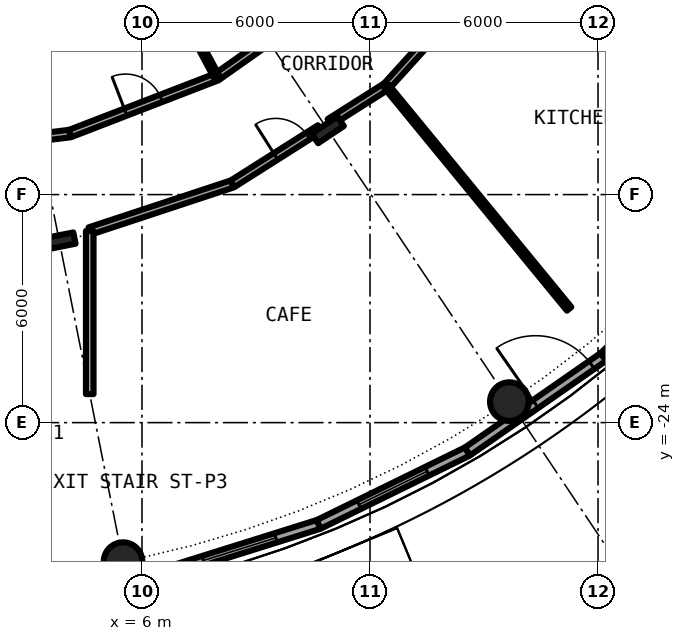
"""IFC4 building model, lengths in metres.
Left out: names, types, materials, properties, quantities, classifications, styles, units other than length and angle.
Written with IfcOpenShell. Run it as: python <this file> out.ifc"""

import sys

from ifc_helpers import new_model, si_unit, direction, frame, frame_2d, origin, origin_2d, place, context, subcontext, project, spatial, rectangle, hollow_circle, i_section, extrude, element, fill, save


model = new_model("IFC4")
c1 = context("Model", 3, precision=1e-05, world=origin(), true_north=direction((0.0, 1.0)))
c2 = subcontext(c1, "Body", "Model", "MODEL_VIEW")
j1 = project(units=[si_unit("LENGTHUNIT", "METRE"), si_unit("PLANEANGLEUNIT", "RADIAN")], contexts=[c1])
p1 = place(None, origin())
s1 = spatial("IfcSite", under=j1, at=p1, CompositionType="ELEMENT")
p2 = place(p1, origin())
s2 = spatial("IfcBuilding", under=s1, at=p2, CompositionType="ELEMENT")
p3 = place(p2, frame((0.0, 0.0, 9.6)))
s3 = spatial("IfcBuildingStorey", under=s2, at=p3, CompositionType="ELEMENT", Elevation=9.6)
for number, where, z_axis, x_axis in (
    (1, (5.501, -27.658, 0.0), (0.0, 0.0, 1.0), (1.0, 0.0, 0.0)),
    (2, (15.667, -23.448, 0.0), (0.0, 0.0, 1.0), (1.0, 0.0, 0.0)),
):
    element("IfcColumn", number, at=place(p3, frame(where, z_axis=z_axis, x_axis=x_axis)), inside=s3, PredefinedType="COLUMN", context=c2, shape_type="SweptSolid", body=[
        extrude(hollow_circle(Radius=0.508, WallThickness=0.05, at=origin_2d()), origin(), (0.0, 0.0, 1.0), 4.5),
    ])
for number, where, z_axis, x_axis in (
    (3, (3.824, -19.223, 0.0), (0.0, 0.0, 1.0), (0.195, -0.981, 0.0)),
    (4, (10.889, -16.297, 0.0), (0.0, 0.0, 1.0), (0.556, -0.831, 0.0)),
):
    element("IfcColumn", number, at=place(p3, frame(where, z_axis=z_axis, x_axis=x_axis)), inside=s3, PredefinedType="COLUMN", context=c2, shape_type="SweptSolid", body=[
        extrude(i_section(OverallWidth=0.303, OverallDepth=0.814, WebThickness=0.021, FlangeThickness=0.04, FilletRadius=0.03, at=origin_2d()), origin(), (0.0, 0.0, 1.0), 4.5),
    ])
p4 = place(p3, frame((6.489, -27.982, 0.0), z_axis=(0.0, 0.0, 1.0), x_axis=(0.954219534331, 0.299107138498, 0.0)))
e5 = element("IfcWall", 5, at=p4, inside=s3, PredefinedType="SOLIDWALL", context=c2, shape_type="SweptSolid", body=[
    extrude(rectangle(XDim=4.359, YDim=0.25, at=frame_2d((2.18, 0.0))), origin(), (0.0, 0.0, 1.0), 4.05),
])
p5 = place(p4, frame((1.18, 0.0, 0.9)))
e6 = element("IfcOpeningElement", 6, at=p5, cuts=e5, PredefinedType="OPENING", context=c2, shape_type="SweptSolid", body=[
    extrude(rectangle(XDim=2.0, YDim=2.4, at=frame_2d((1.0, 1.2))), frame((0.0, 0.135, 0.0), z_axis=(0.0, -1.0, 0.0), x_axis=(1.0, 0.0, 0.0)), (0.0, 0.0, 1.0), 0.27),
])
p6 = place(p3, frame((10.649, -26.678, 0.0), z_axis=(0.0, 0.0, 1.0), x_axis=(0.897938079481, 0.440121807478, 0.0)))
e7 = element("IfcWall", 7, at=p6, inside=s3, PredefinedType="SOLIDWALL", context=c2, shape_type="SweptSolid", body=[
    extrude(rectangle(XDim=4.36, YDim=0.25, at=frame_2d((2.18, 0.0))), origin(), (0.0, 0.0, 1.0), 4.05),
])
p7 = place(p6, frame((1.18, 0.0, 0.9)))
e8 = element("IfcOpeningElement", 8, at=p7, cuts=e7, PredefinedType="OPENING", context=c2, shape_type="SweptSolid", body=[
    extrude(rectangle(XDim=2.0, YDim=2.4, at=frame_2d((1.0, 1.2))), frame((0.0, 0.135, 0.0), z_axis=(0.0, -1.0, 0.0), x_axis=(1.0, 0.0, 0.0)), (0.0, 0.0, 1.0), 0.27),
])
p8 = place(p3, frame((14.564, -24.759, 0.0), z_axis=(0.0, 0.0, 1.0), x_axis=(0.820990800869, 0.57094141984, 0.0)))
e9 = element("IfcWall", 9, at=p8, inside=s3, PredefinedType="SOLIDWALL", context=c2, shape_type="SweptSolid", body=[
    extrude(rectangle(XDim=4.359, YDim=0.25, at=frame_2d((2.18, 0.0))), origin(), (0.0, 0.0, 1.0), 4.05),
])
p9 = place(p8, frame((2.183, 0.0, 0.0)))
e10 = element("IfcOpeningElement", 10, at=p9, cuts=e9, PredefinedType="OPENING", context=c2, shape_type="SweptSolid", body=[
    extrude(rectangle(XDim=1.8, YDim=2.2, at=frame_2d((0.9, 1.1))), frame((0.0, 0.135, 0.0), z_axis=(0.0, -1.0, 0.0), x_axis=(1.0, 0.0, 0.0)), (0.0, 0.0, 1.0), 0.27),
])
p10 = place(p3, frame((18.143, -22.27, 0.0), z_axis=(0.0, 0.0, 1.0), x_axis=(0.725101501119, 0.68864200647, 0.0)))
e11 = element("IfcWall", 11, at=p10, inside=s3, PredefinedType="SOLIDWALL", context=c2, shape_type="SweptSolid", body=[
    extrude(rectangle(XDim=4.359, YDim=0.25, at=frame_2d((2.18, 0.0))), origin(), (0.0, 0.0, 1.0), 4.05),
])
p11 = place(p10, frame((1.18, 0.0, 0.9)))
e12 = element("IfcOpeningElement", 12, at=p11, cuts=e11, PredefinedType="OPENING", context=c2, shape_type="SweptSolid", body=[
    extrude(rectangle(XDim=2.0, YDim=2.4, at=frame_2d((1.0, 1.2))), frame((0.0, 0.135, 0.0), z_axis=(0.0, -1.0, 0.0), x_axis=(1.0, 0.0, 0.0)), (0.0, 0.0, 1.0), 0.27),
])
p12 = place(p3, frame((4.625, -18.958, 0.0), z_axis=(0.0, 0.0, 1.0), x_axis=(0.949562483826, 0.313577883963, 0.0)))
e13 = element("IfcWall", 13, at=p12, inside=s3, PredefinedType="PARTITIONING", context=c2, shape_type="SweptSolid", body=[
    extrude(rectangle(XDim=3.954, YDim=0.2, at=frame_2d((1.977, 0.0))), origin(), (0.0, 0.0, 1.0), 3.63),
])
p13 = place(p3, frame((8.38, -17.718, 0.0), z_axis=(0.0, 0.0, 1.0), x_axis=(0.844806925432, 0.535071265106, 0.0)))
e14 = element("IfcWall", 14, at=p13, inside=s3, PredefinedType="PARTITIONING", context=c2, shape_type="SweptSolid", body=[
    extrude(rectangle(XDim=2.725, YDim=0.2, at=frame_2d((1.362, 0.0))), origin(), (0.0, 0.0, 1.0), 3.63),
])
p14 = place(p13, frame((1.35, 0.0, 0.0)))
e15 = element("IfcOpeningElement", 15, at=p14, cuts=e14, PredefinedType="OPENING", context=c2, shape_type="SweptSolid", body=[
    extrude(rectangle(XDim=1.0, YDim=2.3, at=frame_2d((0.5, 1.15))), frame((0.0, 0.11, 0.0), z_axis=(0.0, -1.0, 0.0), x_axis=(1.0, 0.0, 0.0)), (0.0, 0.0, 1.0), 0.22),
])
p15 = place(p3, frame((10.939, -16.098, 0.0), z_axis=(0.0, 0.0, 1.0), x_axis=(0.844789975167, 0.5350980264, 0.0)))
e16 = element("IfcWall", 16, at=p15, inside=s3, PredefinedType="PARTITIONING", context=c2, shape_type="SweptSolid", body=[
    extrude(rectangle(XDim=1.77, YDim=0.2, at=frame_2d((0.885, 0.0))), origin(), (0.0, 0.0, 1.0), 3.63),
])
p16 = place(p3, frame((12.434, -15.151, 0.0), z_axis=(0.0, 0.0, 1.0), x_axis=(0.671610704694, 0.740904218736, 0.0)))
e17 = element("IfcWall", 17, at=p16, inside=s3, PredefinedType="PARTITIONING", context=c2, shape_type="SweptSolid", body=[
    extrude(rectangle(XDim=5.598, YDim=0.2, at=frame_2d((2.799, 0.0))), origin(), (0.0, 0.0, 1.0), 3.63),
])
p17 = place(p16, frame((2.346, 0.0, 0.0)))
e18 = element("IfcOpeningElement", 18, at=p17, cuts=e17, PredefinedType="OPENING", context=c2, shape_type="SweptSolid", body=[
    extrude(rectangle(XDim=1.0, YDim=2.3, at=frame_2d((0.5, 1.15))), frame((0.0, 0.11, 0.0), z_axis=(0.0, -1.0, 0.0), x_axis=(1.0, 0.0, 0.0)), (0.0, 0.0, 1.0), 0.22),
])
p18 = place(p3, frame((0.0, -16.9, 0.0), z_axis=(0.0, 0.0, 1.0), x_axis=(0.992496033272, 0.122276833211, 0.0)))
e19 = element("IfcWall", 19, at=p18, inside=s3, PredefinedType="PARTITIONING", context=c2, shape_type="SweptSolid", body=[
    extrude(rectangle(XDim=4.137, YDim=0.2, at=frame_2d((2.068, 0.0))), origin(), (0.0, 0.0, 1.0), 4.05),
])
p19 = place(p3, frame((4.106, -16.394, 0.0), z_axis=(0.0, 0.0, 1.0), x_axis=(0.932943640288, 0.360022449363, 0.0)))
e20 = element("IfcWall", 20, at=p19, inside=s3, PredefinedType="PARTITIONING", context=c2, shape_type="SweptSolid", body=[
    extrude(rectangle(XDim=4.139, YDim=0.2, at=frame_2d((2.069, 0.0))), origin(), (0.0, 0.0, 1.0), 4.05),
])
p20 = place(p19, frame((1.569, 0.0, 0.0)))
e21 = element("IfcOpeningElement", 21, at=p20, cuts=e20, PredefinedType="OPENING", context=c2, shape_type="SweptSolid", body=[
    extrude(rectangle(XDim=1.0, YDim=2.3, at=frame_2d((0.5, 1.15))), frame((0.0, 0.11, 0.0), z_axis=(0.0, -1.0, 0.0), x_axis=(1.0, 0.0, 0.0)), (0.0, 0.0, 1.0), 0.22),
])
p21 = place(p3, frame((7.967, -14.904, 0.0), z_axis=(0.0, 0.0, 1.0), x_axis=(0.817567680547, 0.575832517079, 0.0)))
e22 = element("IfcWall", 22, at=p21, inside=s3, PredefinedType="PARTITIONING", context=c2, shape_type="SweptSolid", body=[
    extrude(rectangle(XDim=4.137, YDim=0.2, at=frame_2d((2.068, 0.0))), origin(), (0.0, 0.0, 1.0), 4.05),
])
p22 = place(p21, frame((1.568, 0.0, 0.0)))
e23 = element("IfcOpeningElement", 23, at=p22, cuts=e22, PredefinedType="OPENING", context=c2, shape_type="SweptSolid", body=[
    extrude(rectangle(XDim=1.0, YDim=2.3, at=frame_2d((0.5, 1.15))), frame((0.0, 0.11, 0.0), z_axis=(0.0, -1.0, 0.0), x_axis=(1.0, 0.0, 0.0)), (0.0, 0.0, 1.0), 0.22),
])
p23 = place(p3, frame((4.625, -23.25, 0.0), z_axis=(0.0, 0.0, 1.0), x_axis=(0.0, 1.0, 0.0)))
e24 = element("IfcWall", 24, at=p23, inside=s3, PredefinedType="PARTITIONING", context=c2, shape_type="SweptSolid", body=[
    extrude(rectangle(XDim=4.292, YDim=0.2, at=frame_2d((2.146, 0.0))), origin(), (0.0, 0.0, 1.0), 4.05),
])
p24 = place(p3, frame((3.639, -6.808, 0.0), z_axis=(0.0, 0.0, 1.0), x_axis=(0.471460365694, -0.881887251059, 0.0)))
e25 = element("IfcWall", 25, at=p24, inside=s3, PredefinedType="PARTITIONING", context=c2, shape_type="SweptSolid", body=[
    extrude(rectangle(XDim=9.18, YDim=0.15, at=frame_2d((4.59, 0.0))), origin(), (0.0, 0.0, 1.0), 4.05),
])
p25 = place(p3, frame((12.434, -15.151, 0.0), z_axis=(0.0, 0.0, 1.0), x_axis=(0.634381303318, -0.773020285633, 0.0)))
e26 = element("IfcWall", 26, at=p25, inside=s3, PredefinedType="PARTITIONING", context=c2, shape_type="SweptSolid", body=[
    extrude(rectangle(XDim=7.576, YDim=0.15, at=frame_2d((3.788, 0.0))), origin(), (0.0, 0.0, 1.0), 4.05),
])
p26 = place(p3, frame((16.633, -11.118, 0.0), z_axis=(0.0, 0.0, 1.0), x_axis=(0.831415754305, -0.555650828752, 0.0)))
e27 = element("IfcWall", 27, at=p26, inside=s3, PredefinedType="PARTITIONING", context=c2, shape_type="SweptSolid", body=[
    extrude(rectangle(XDim=7.168, YDim=0.15, at=frame_2d((3.584, 0.0))), origin(), (0.0, 0.0, 1.0), 4.05),
])
p27 = place(p5, origin())
e28 = element("IfcWindow", 28, at=p27, inside=s3, PartitioningType="SINGLE_PANEL", PredefinedType="WINDOW", context=c2, shape_type="SweptSolid", body=[
    extrude(rectangle(XDim=2.0, YDim=2.4, at=frame_2d((1.0, 1.2))), frame((0.0, 0.03, 0.0), z_axis=(0.0, -1.0, 0.0), x_axis=(1.0, 0.0, 0.0)), (0.0, 0.0, 1.0), 0.06),
])
fill(e6, e28)
p28 = place(p7, origin())
e29 = element("IfcWindow", 29, at=p28, inside=s3, PartitioningType="SINGLE_PANEL", PredefinedType="WINDOW", context=c2, shape_type="SweptSolid", body=[
    extrude(rectangle(XDim=2.0, YDim=2.4, at=frame_2d((1.0, 1.2))), frame((0.0, 0.03, 0.0), z_axis=(0.0, -1.0, 0.0), x_axis=(1.0, 0.0, 0.0)), (0.0, 0.0, 1.0), 0.06),
])
fill(e8, e29)
p29 = place(p9, origin())
e30 = element("IfcDoor", 30, at=p29, inside=s3, OperationType="SINGLE_SWING_LEFT", PredefinedType="DOOR", context=c2, shape_type="SweptSolid", body=[
    extrude(rectangle(XDim=1.8, YDim=2.2, at=frame_2d((0.9, 1.1))), frame((0.0, 0.025, 0.0), z_axis=(0.0, -1.0, 0.0), x_axis=(1.0, 0.0, 0.0)), (0.0, 0.0, 1.0), 0.05),
])
fill(e10, e30)
p30 = place(p14, origin())
e31 = element("IfcDoor", 31, at=p30, inside=s3, OperationType="SINGLE_SWING_RIGHT", PredefinedType="DOOR", context=c2, shape_type="SweptSolid", body=[
    extrude(rectangle(XDim=1.0, YDim=2.3, at=frame_2d((0.5, 1.15))), frame((0.0, 0.025, 0.0), z_axis=(0.0, -1.0, 0.0), x_axis=(1.0, 0.0, 0.0)), (0.0, 0.0, 1.0), 0.05),
])
fill(e15, e31)
p31 = place(p20, origin())
e32 = element("IfcDoor", 32, at=p31, inside=s3, OperationType="SINGLE_SWING_RIGHT", PredefinedType="DOOR", context=c2, shape_type="SweptSolid", body=[
    extrude(rectangle(XDim=1.0, YDim=2.3, at=frame_2d((0.5, 1.15))), frame((0.0, 0.025, 0.0), z_axis=(0.0, -1.0, 0.0), x_axis=(1.0, 0.0, 0.0)), (0.0, 0.0, 1.0), 0.05),
])
fill(e21, e32)
save(model, sys.argv[1])
